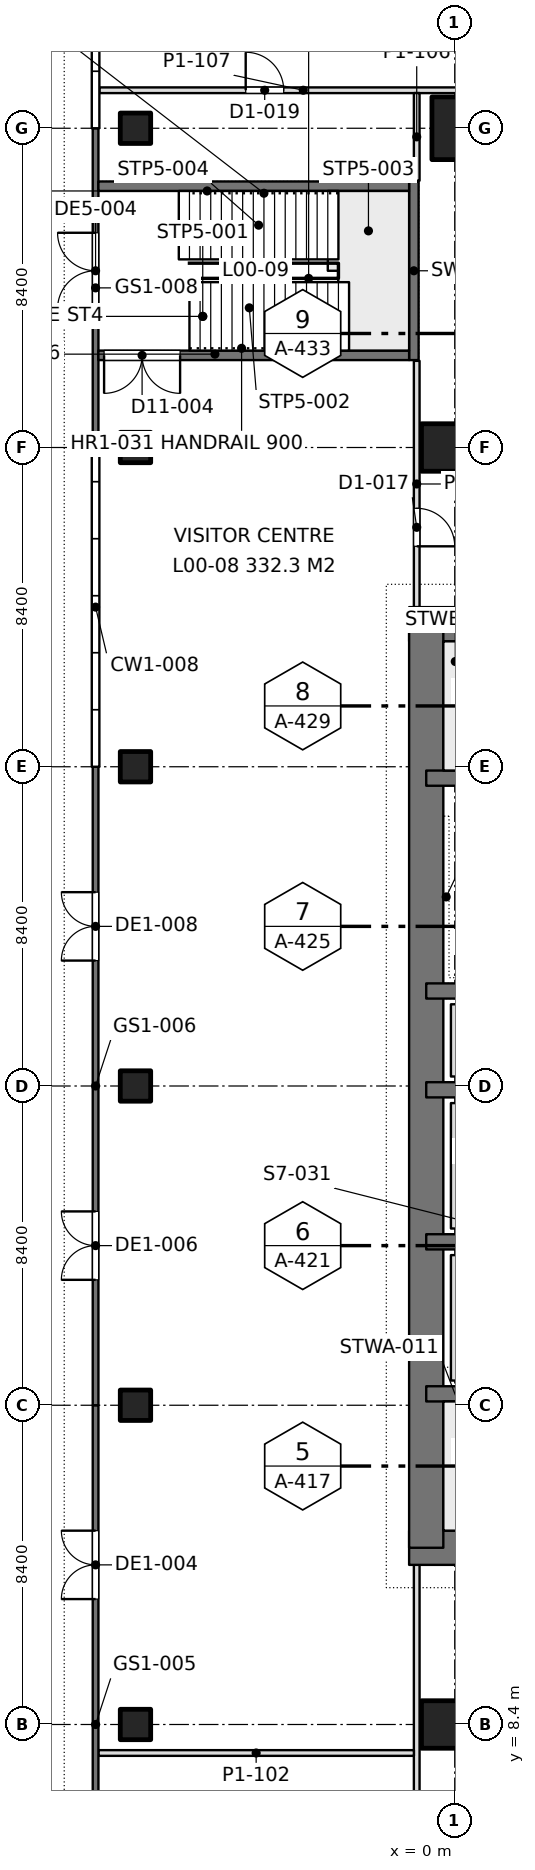
"""IFC4 building model, lengths in metres.
Left out: names, types, materials, properties, quantities, classifications, styles, units other than length and angle.
Written with IfcOpenShell. Run it as: python <this file> out.ifc"""

import sys

from ifc_helpers import new_model, si_unit, direction, frame, frame_2d, origin, origin_2d, place, context, subcontext, project, spatial, rectangle, extrude, element, fill, save


model = new_model("IFC4")
c1 = context("Model", 3, precision=1e-05, world=origin(), true_north=direction((0.0, 1.0)))
c2 = subcontext(c1, "Body", "Model", "MODEL_VIEW")
j1 = project(units=[si_unit("LENGTHUNIT", "METRE"), si_unit("PLANEANGLEUNIT", "RADIAN")], contexts=[c1])
p1 = place(None, origin())
s1 = spatial("IfcSite", under=j1, at=p1, CompositionType="ELEMENT")
p2 = place(p1, origin())
s2 = spatial("IfcBuilding", under=s1, at=p2, CompositionType="ELEMENT")
p3 = place(p2, origin())
s3 = spatial("IfcBuildingStorey", under=s2, at=p3, CompositionType="ELEMENT", Elevation=0.0)
for number, where, z_axis, x_axis in (
    (1, (-8.4, 8.4, 0.0), (0.0, 0.0, 1.0), (1.0, 0.0, 0.0)),
    (2, (-8.4, 16.8, 0.0), (0.0, 0.0, 1.0), (1.0, 0.0, 0.0)),
    (3, (-8.4, 25.2, 0.0), (0.0, 0.0, 1.0), (1.0, 0.0, 0.0)),
    (4, (-8.4, 33.6, 0.0), (0.0, 0.0, 1.0), (1.0, 0.0, 0.0)),
    (5, (-8.4, 42.0, 0.0), (0.0, 0.0, 1.0), (1.0, 0.0, 0.0)),
    (6, (-8.4, 50.4, 0.0), (0.0, 0.0, 1.0), (1.0, 0.0, 0.0)),
):
    element("IfcColumn", number, at=place(p3, frame(where, z_axis=z_axis, x_axis=x_axis)), inside=s3, PredefinedType="COLUMN", context=c2, shape_type="SweptSolid", body=[
        extrude(rectangle(XDim=0.8, YDim=0.8, at=origin_2d()), origin(), (0.0, 0.0, 1.0), 5.4),
    ])
for number, where, z_axis, x_axis in (
    (7, (0.0, 8.4, 0.0), (0.0, 0.0, 1.0), (0.0, 1.0, 0.0)),
    (8, (0.0, 42.0, 0.0), (0.0, 0.0, 1.0), (0.0, 1.0, 0.0)),
):
    element("IfcColumn", number, at=place(p3, frame(where, z_axis=z_axis, x_axis=x_axis)), inside=s3, PredefinedType="COLUMN", context=c2, shape_type="SweptSolid", body=[
        extrude(rectangle(XDim=1.25, YDim=1.75, at=origin_2d()), origin(), (0.0, 0.0, 1.0), 5.4),
    ])
p4 = place(p3, frame((0.0, 50.4, 0.0), z_axis=(0.0, 0.0, 1.0), x_axis=(1.0, 0.0, 0.0)))
e9 = element("IfcColumn", 9, at=p4, inside=s3, PredefinedType="COLUMN", context=c2, shape_type="SweptSolid", body=[
    extrude(rectangle(XDim=1.2, YDim=1.65, at=origin_2d()), origin(), (0.0, 0.0, 1.0), 5.4),
])
p5 = place(p3, frame((-1.2, 13.05, 0.0), z_axis=(0.0, 0.0, 1.0), x_axis=(1.0, 0.0, 0.0)))
e10 = element("IfcWall", 10, at=p5, inside=s3, PredefinedType="SHEAR", context=c2, shape_type="SweptSolid", body=[
    extrude(rectangle(XDim=18.0, YDim=0.9, at=frame_2d((9.0, 0.0))), origin(), (0.0, 0.0, 1.0), 5.4),
])
p6 = place(p5, frame((8.95, 0.0, 0.0)))
e11 = element("IfcOpeningElement", 11, at=p6, cuts=e10, PredefinedType="OPENING", context=c2, shape_type="SweptSolid", body=[
    extrude(rectangle(XDim=1.8, YDim=2.4, at=frame_2d((0.9, 1.2))), frame((0.0, 0.46, 0.0), z_axis=(0.0, -1.0, 0.0), x_axis=(1.0, 0.0, 0.0)), (0.0, 0.0, 1.0), 0.92),
])
p7 = place(p3, frame((-1.2, 37.35, 0.0), z_axis=(0.0, 0.0, 1.0), x_axis=(1.0, 0.0, 0.0)))
e12 = element("IfcWall", 12, at=p7, inside=s3, PredefinedType="SHEAR", context=c2, shape_type="SweptSolid", body=[
    extrude(rectangle(XDim=18.0, YDim=0.9, at=frame_2d((9.0, 0.0))), origin(), (0.0, 0.0, 1.0), 5.4),
])
p8 = place(p7, frame((8.95, 0.0, 0.0)))
e13 = element("IfcOpeningElement", 13, at=p8, cuts=e12, PredefinedType="OPENING", context=c2, shape_type="SweptSolid", body=[
    extrude(rectangle(XDim=1.8, YDim=2.4, at=frame_2d((0.9, 1.2))), frame((0.0, 0.46, 0.0), z_axis=(0.0, -1.0, 0.0), x_axis=(1.0, 0.0, 0.0)), (0.0, 0.0, 1.0), 0.92),
])
p9 = place(p3, frame((-0.75, 13.05, 0.0), z_axis=(0.0, 0.0, 1.0), x_axis=(0.0, 1.0, 0.0)))
e14 = element("IfcWall", 14, at=p9, inside=s3, PredefinedType="SHEAR", context=c2, shape_type="SweptSolid", body=[
    extrude(rectangle(XDim=24.3, YDim=0.9, at=frame_2d((12.15, 0.0))), origin(), (0.0, 0.0, 1.0), 5.4),
])
for number, where, z_axis, x_axis in (
    (15, (-0.75, 17.1, 0.0), (0.0, 0.0, 1.0), (1.0, 0.0, 0.0)),
    (16, (-0.75, 21.1, 0.0), (0.0, 0.0, 1.0), (1.0, 0.0, 0.0)),
    (17, (-0.75, 25.1, 0.0), (0.0, 0.0, 1.0), (1.0, 0.0, 0.0)),
    (18, (-0.75, 27.7, 0.0), (0.0, 0.0, 1.0), (1.0, 0.0, 0.0)),
    (19, (-0.75, 33.3, 0.0), (0.0, 0.0, 1.0), (1.0, 0.0, 0.0)),
):
    element("IfcWall", number, at=place(p3, frame(where, z_axis=z_axis, x_axis=x_axis)), inside=s3, PredefinedType="SHEAR", context=c2, shape_type="SweptSolid", body=[
        extrude(rectangle(XDim=7.65, YDim=0.4, at=frame_2d((3.825, 0.0))), origin(), (0.0, 0.0, 1.0), 5.4),
    ])
p10 = place(p3, frame((-9.45, 0.0, 0.0), z_axis=(0.0, 0.0, 1.0), x_axis=(0.0, 1.0, 0.0)))
e20 = element("IfcWall", 20, at=p10, inside=s3, PredefinedType="SOLIDWALL", context=c2, shape_type="SweptSolid", body=[
    extrude(rectangle(XDim=16.8, YDim=0.15, at=frame_2d((8.4, 0.0))), origin(), (0.0, 0.0, 1.0), 5.2),
])
p11 = place(p10, frame((3.0, 0.0, 0.0)))
e21 = element("IfcOpeningElement", 21, at=p11, cuts=e20, PredefinedType="OPENING", context=c2, shape_type="SweptSolid", body=[
    extrude(rectangle(XDim=1.0, YDim=2.2, at=frame_2d((0.5, 1.1))), frame((0.0, 0.085, 0.0), z_axis=(0.0, -1.0, 0.0), x_axis=(1.0, 0.0, 0.0)), (0.0, 0.0, 1.0), 0.17),
])
p12 = place(p10, frame((11.7, 0.0, 0.0)))
e22 = element("IfcOpeningElement", 22, at=p12, cuts=e20, PredefinedType="OPENING", context=c2, shape_type="SweptSolid", body=[
    extrude(rectangle(XDim=1.8, YDim=2.4, at=frame_2d((0.9, 1.2))), frame((0.0, 0.085, 0.0), z_axis=(0.0, -1.0, 0.0), x_axis=(1.0, 0.0, 0.0)), (0.0, 0.0, 1.0), 0.17),
])
p13 = place(p3, frame((-9.45, 16.8, 0.0), z_axis=(0.0, 0.0, 1.0), x_axis=(0.0, 1.0, 0.0)))
e23 = element("IfcWall", 23, at=p13, inside=s3, PredefinedType="SOLIDWALL", context=c2, shape_type="SweptSolid", body=[
    extrude(rectangle(XDim=16.8, YDim=0.15, at=frame_2d((8.4, 0.0))), origin(), (0.0, 0.0, 1.0), 5.2),
])
p14 = place(p13, frame((3.3, 0.0, 0.0)))
e24 = element("IfcOpeningElement", 24, at=p14, cuts=e23, PredefinedType="OPENING", context=c2, shape_type="SweptSolid", body=[
    extrude(rectangle(XDim=1.8, YDim=2.4, at=frame_2d((0.9, 1.2))), frame((0.0, 0.085, 0.0), z_axis=(0.0, -1.0, 0.0), x_axis=(1.0, 0.0, 0.0)), (0.0, 0.0, 1.0), 0.17),
])
p15 = place(p13, frame((11.7, 0.0, 0.0)))
e25 = element("IfcOpeningElement", 25, at=p15, cuts=e23, PredefinedType="OPENING", context=c2, shape_type="SweptSolid", body=[
    extrude(rectangle(XDim=1.8, YDim=2.4, at=frame_2d((0.9, 1.2))), frame((0.0, 0.085, 0.0), z_axis=(0.0, -1.0, 0.0), x_axis=(1.0, 0.0, 0.0)), (0.0, 0.0, 1.0), 0.17),
])
p16 = place(p3, frame((-9.45, 42.0, 0.0), z_axis=(0.0, 0.0, 1.0), x_axis=(0.0, 1.0, 0.0)))
e26 = element("IfcWall", 26, at=p16, inside=s3, PredefinedType="SOLIDWALL", context=c2, shape_type="SweptSolid", body=[
    extrude(rectangle(XDim=8.4, YDim=0.15, at=frame_2d((4.2, 0.0))), origin(), (0.0, 0.0, 1.0), 5.2),
])
p17 = place(p16, frame((3.65, 0.0, 0.0)))
e27 = element("IfcOpeningElement", 27, at=p17, cuts=e26, PredefinedType="OPENING", context=c2, shape_type="SweptSolid", body=[
    extrude(rectangle(XDim=2.0, YDim=2.4, at=frame_2d((1.0, 1.2))), frame((0.0, 0.085, 0.0), z_axis=(0.0, -1.0, 0.0), x_axis=(1.0, 0.0, 0.0)), (0.0, 0.0, 1.0), 0.17),
])
p18 = place(p3, frame((-9.35, 51.4, 0.0), z_axis=(0.0, 0.0, 1.0), x_axis=(1.0, 0.0, 0.0)))
e28 = element("IfcWall", 28, at=p18, inside=s3, PredefinedType="PARTITIONING", context=c2, shape_type="SweptSolid", body=[
    extrude(rectangle(XDim=10.73, YDim=0.15, at=frame_2d((5.365, 0.0))), origin(), (0.0, 0.0, 1.0), 4.6),
])
p19 = place(p18, frame((3.85, 0.0, 0.0)))
e29 = element("IfcOpeningElement", 29, at=p19, cuts=e28, PredefinedType="OPENING", context=c2, shape_type="SweptSolid", body=[
    extrude(rectangle(XDim=1.0, YDim=2.2, at=frame_2d((0.5, 1.1))), frame((0.0, 0.085, 0.0), z_axis=(0.0, -1.0, 0.0), x_axis=(1.0, 0.0, 0.0)), (0.0, 0.0, 1.0), 0.17),
])
p20 = place(p3, frame((-1.0, -0.926, 0.0), z_axis=(0.0, 0.0, 1.0), x_axis=(0.0, 1.0, 0.0)))
e30 = element("IfcWall", 30, at=p20, inside=s3, PredefinedType="PARTITIONING", context=c2, shape_type="SweptSolid", body=[
    extrude(rectangle(XDim=13.528, YDim=0.15, at=frame_2d((6.764, 0.0))), origin(), (0.0, 0.0, 1.0), 4.6),
])
p21 = place(p20, frame((4.626, 0.0, 0.0)))
e31 = element("IfcOpeningElement", 31, at=p21, cuts=e30, PredefinedType="OPENING", context=c2, shape_type="SweptSolid", body=[
    extrude(rectangle(XDim=1.0, YDim=2.2, at=frame_2d((0.5, 1.1))), frame((0.0, 0.085, 0.0), z_axis=(0.0, -1.0, 0.0), x_axis=(1.0, 0.0, 0.0)), (0.0, 0.0, 1.0), 0.17),
])
p22 = place(p3, frame((-1.0, 37.8, 0.0), z_axis=(0.0, 0.0, 1.0), x_axis=(0.0, 1.0, 0.0)))
e32 = element("IfcWall", 32, at=p22, inside=s3, PredefinedType="PARTITIONING", context=c2, shape_type="SweptSolid", body=[
    extrude(rectangle(XDim=6.48, YDim=0.15, at=frame_2d((3.24, 0.0))), origin(), (0.0, 0.0, 1.0), 4.6),
])
p23 = place(p22, frame((1.6, 0.0, 0.0)))
e33 = element("IfcOpeningElement", 33, at=p23, cuts=e32, PredefinedType="OPENING", context=c2, shape_type="SweptSolid", body=[
    extrude(rectangle(XDim=1.0, YDim=2.2, at=frame_2d((0.5, 1.1))), frame((0.0, 0.085, 0.0), z_axis=(0.0, -1.0, 0.0), x_axis=(1.0, 0.0, 0.0)), (0.0, 0.0, 1.0), 0.17),
])
p24 = place(p3, frame((-1.0, 49.02, 0.0), z_axis=(0.0, 0.0, 1.0), x_axis=(0.0, 1.0, 0.0)))
e34 = element("IfcWall", 34, at=p24, inside=s3, PredefinedType="PARTITIONING", context=c2, shape_type="SweptSolid", body=[
    extrude(rectangle(XDim=2.306, YDim=0.15, at=frame_2d((1.153, 0.0))), origin(), (0.0, 0.0, 1.0), 4.6),
])
p25 = place(p3, frame((-9.376, 7.65, 0.0), z_axis=(0.0, 0.0, 1.0), x_axis=(1.0, 0.0, 0.0)))
e35 = element("IfcWall", 35, at=p25, inside=s3, PredefinedType="PARTITIONING", context=c2, shape_type="SweptSolid", body=[
    extrude(rectangle(XDim=8.302, YDim=0.15, at=frame_2d((4.151, 0.0))), origin(), (0.0, 0.0, 1.0), 4.6),
])
for number, where, z_axis, x_axis in (
    (36, (0.0, 17.45, 0.0), (0.0, 0.0, 1.0), (0.0, 1.0, 0.0)),
    (37, (0.0, 21.45, 0.0), (0.0, 0.0, 1.0), (0.0, 1.0, 0.0)),
):
    element("IfcWall", number, at=place(p3, frame(where, z_axis=z_axis, x_axis=x_axis)), inside=s3, PredefinedType="PLUMBINGWALL", context=c2, shape_type="SweptSolid", body=[
        extrude(rectangle(XDim=3.3, YDim=0.2, at=frame_2d((1.65, 0.0))), origin(), (0.0, 0.0, 1.0), 1.2),
    ])
p26 = place(p3, frame((0.0, 25.45, 0.0), z_axis=(0.0, 0.0, 1.0), x_axis=(0.0, 1.0, 0.0)))
e38 = element("IfcWall", 38, at=p26, inside=s3, PredefinedType="PLUMBINGWALL", context=c2, shape_type="SweptSolid", body=[
    extrude(rectangle(XDim=1.9, YDim=0.2, at=frame_2d((0.95, 0.0))), origin(), (0.0, 0.0, 1.0), 1.2),
])
p27 = place(p3, frame((-9.376, 44.425, 0.0), z_axis=(0.0, 0.0, 1.0), x_axis=(1.0, 0.0, 0.0)))
e39 = element("IfcWall", 39, at=p27, inside=s3, PredefinedType="SOLIDWALL", context=c2, shape_type="SweptSolid", body=[
    extrude(rectangle(XDim=8.176, YDim=0.25, at=frame_2d((4.088, 0.0))), origin(), (0.0, 0.0, 1.0), 5.4),
])
p28 = place(p27, frame((0.15, 0.0, 0.0)))
e40 = element("IfcOpeningElement", 40, at=p28, cuts=e39, PredefinedType="OPENING", context=c2, shape_type="SweptSolid", body=[
    extrude(rectangle(XDim=2.0, YDim=2.2, at=frame_2d((1.0, 1.1))), frame((0.0, 0.135, 0.0), z_axis=(0.0, -1.0, 0.0), x_axis=(1.0, 0.0, 0.0)), (0.0, 0.0, 1.0), 0.27),
])
p29 = place(p3, frame((-9.376, 48.875, 0.0), z_axis=(0.0, 0.0, 1.0), x_axis=(1.0, 0.0, 0.0)))
e41 = element("IfcWall", 41, at=p29, inside=s3, PredefinedType="SOLIDWALL", context=c2, shape_type="SweptSolid", body=[
    extrude(rectangle(XDim=8.176, YDim=0.25, at=frame_2d((4.088, 0.0))), origin(), (0.0, 0.0, 1.0), 5.4),
])
p30 = place(p3, frame((-1.075, 44.3, 0.0), z_axis=(0.0, 0.0, 1.0), x_axis=(0.0, 1.0, 0.0)))
e42 = element("IfcWall", 42, at=p30, inside=s3, PredefinedType="SOLIDWALL", context=c2, shape_type="SweptSolid", body=[
    extrude(rectangle(XDim=4.7, YDim=0.25, at=frame_2d((2.35, 0.0))), origin(), (0.0, 0.0, 1.0), 5.4),
])
p31 = place(p12, origin())
e43 = element("IfcDoor", 43, at=p31, inside=s3, OperationType="DOUBLE_DOOR_SINGLE_SWING", PredefinedType="DOOR", context=c2, shape_type="SweptSolid", body=[
    extrude(rectangle(XDim=1.8, YDim=2.4, at=frame_2d((0.9, 1.2))), frame((0.0, 0.025, 0.0), z_axis=(0.0, -1.0, 0.0), x_axis=(1.0, 0.0, 0.0)), (0.0, 0.0, 1.0), 0.05),
])
fill(e22, e43)
p32 = place(p14, origin())
e44 = element("IfcDoor", 44, at=p32, inside=s3, OperationType="DOUBLE_DOOR_SINGLE_SWING", PredefinedType="DOOR", context=c2, shape_type="SweptSolid", body=[
    extrude(rectangle(XDim=1.8, YDim=2.4, at=frame_2d((0.9, 1.2))), frame((0.0, 0.025, 0.0), z_axis=(0.0, -1.0, 0.0), x_axis=(1.0, 0.0, 0.0)), (0.0, 0.0, 1.0), 0.05),
])
fill(e24, e44)
p33 = place(p15, origin())
e45 = element("IfcDoor", 45, at=p33, inside=s3, OperationType="DOUBLE_DOOR_SINGLE_SWING", PredefinedType="DOOR", context=c2, shape_type="SweptSolid", body=[
    extrude(rectangle(XDim=1.8, YDim=2.4, at=frame_2d((0.9, 1.2))), frame((0.0, 0.025, 0.0), z_axis=(0.0, -1.0, 0.0), x_axis=(1.0, 0.0, 0.0)), (0.0, 0.0, 1.0), 0.05),
])
fill(e25, e45)
p34 = place(p17, origin())
e46 = element("IfcDoor", 46, at=p34, inside=s3, OperationType="DOUBLE_DOOR_SINGLE_SWING", PredefinedType="DOOR", context=c2, shape_type="SweptSolid", body=[
    extrude(rectangle(XDim=2.0, YDim=2.4, at=frame_2d((1.0, 1.2))), frame((0.0, 0.025, 0.0), z_axis=(0.0, -1.0, 0.0), x_axis=(1.0, 0.0, 0.0)), (0.0, 0.0, 1.0), 0.05),
])
fill(e27, e46)
p35 = place(p19, origin())
e47 = element("IfcDoor", 47, at=p35, inside=s3, OperationType="SINGLE_SWING_LEFT", PredefinedType="DOOR", context=c2, shape_type="SweptSolid", body=[
    extrude(rectangle(XDim=1.0, YDim=2.2, at=frame_2d((0.5, 1.1))), frame((0.0, 0.025, 0.0), z_axis=(0.0, -1.0, 0.0), x_axis=(1.0, 0.0, 0.0)), (0.0, 0.0, 1.0), 0.05),
])
fill(e29, e47)
p36 = place(p23, frame((1.0, 0.0, 0.0), z_axis=(0.0, 0.0, 1.0), x_axis=(-1.0, 0.0, 0.0)))
e48 = element("IfcDoor", 48, at=p36, inside=s3, OperationType="SINGLE_SWING_RIGHT", PredefinedType="DOOR", context=c2, shape_type="SweptSolid", body=[
    extrude(rectangle(XDim=1.0, YDim=2.2, at=frame_2d((0.5, 1.1))), frame((0.0, 0.025, 0.0), z_axis=(0.0, -1.0, 0.0), x_axis=(1.0, 0.0, 0.0)), (0.0, 0.0, 1.0), 0.05),
])
fill(e33, e48)
p37 = place(p28, frame((2.0, 0.0, 0.0), z_axis=(0.0, 0.0, 1.0), x_axis=(-1.0, 0.0, 0.0)))
e49 = element("IfcDoor", 49, at=p37, inside=s3, OperationType="DOUBLE_DOOR_SINGLE_SWING", PredefinedType="DOOR", context=c2, shape_type="SweptSolid", body=[
    extrude(rectangle(XDim=2.0, YDim=2.2, at=frame_2d((1.0, 1.1))), frame((0.0, 0.025, 0.0), z_axis=(0.0, -1.0, 0.0), x_axis=(1.0, 0.0, 0.0)), (0.0, 0.0, 1.0), 0.05),
])
fill(e40, e49)
save(model, sys.argv[1])
